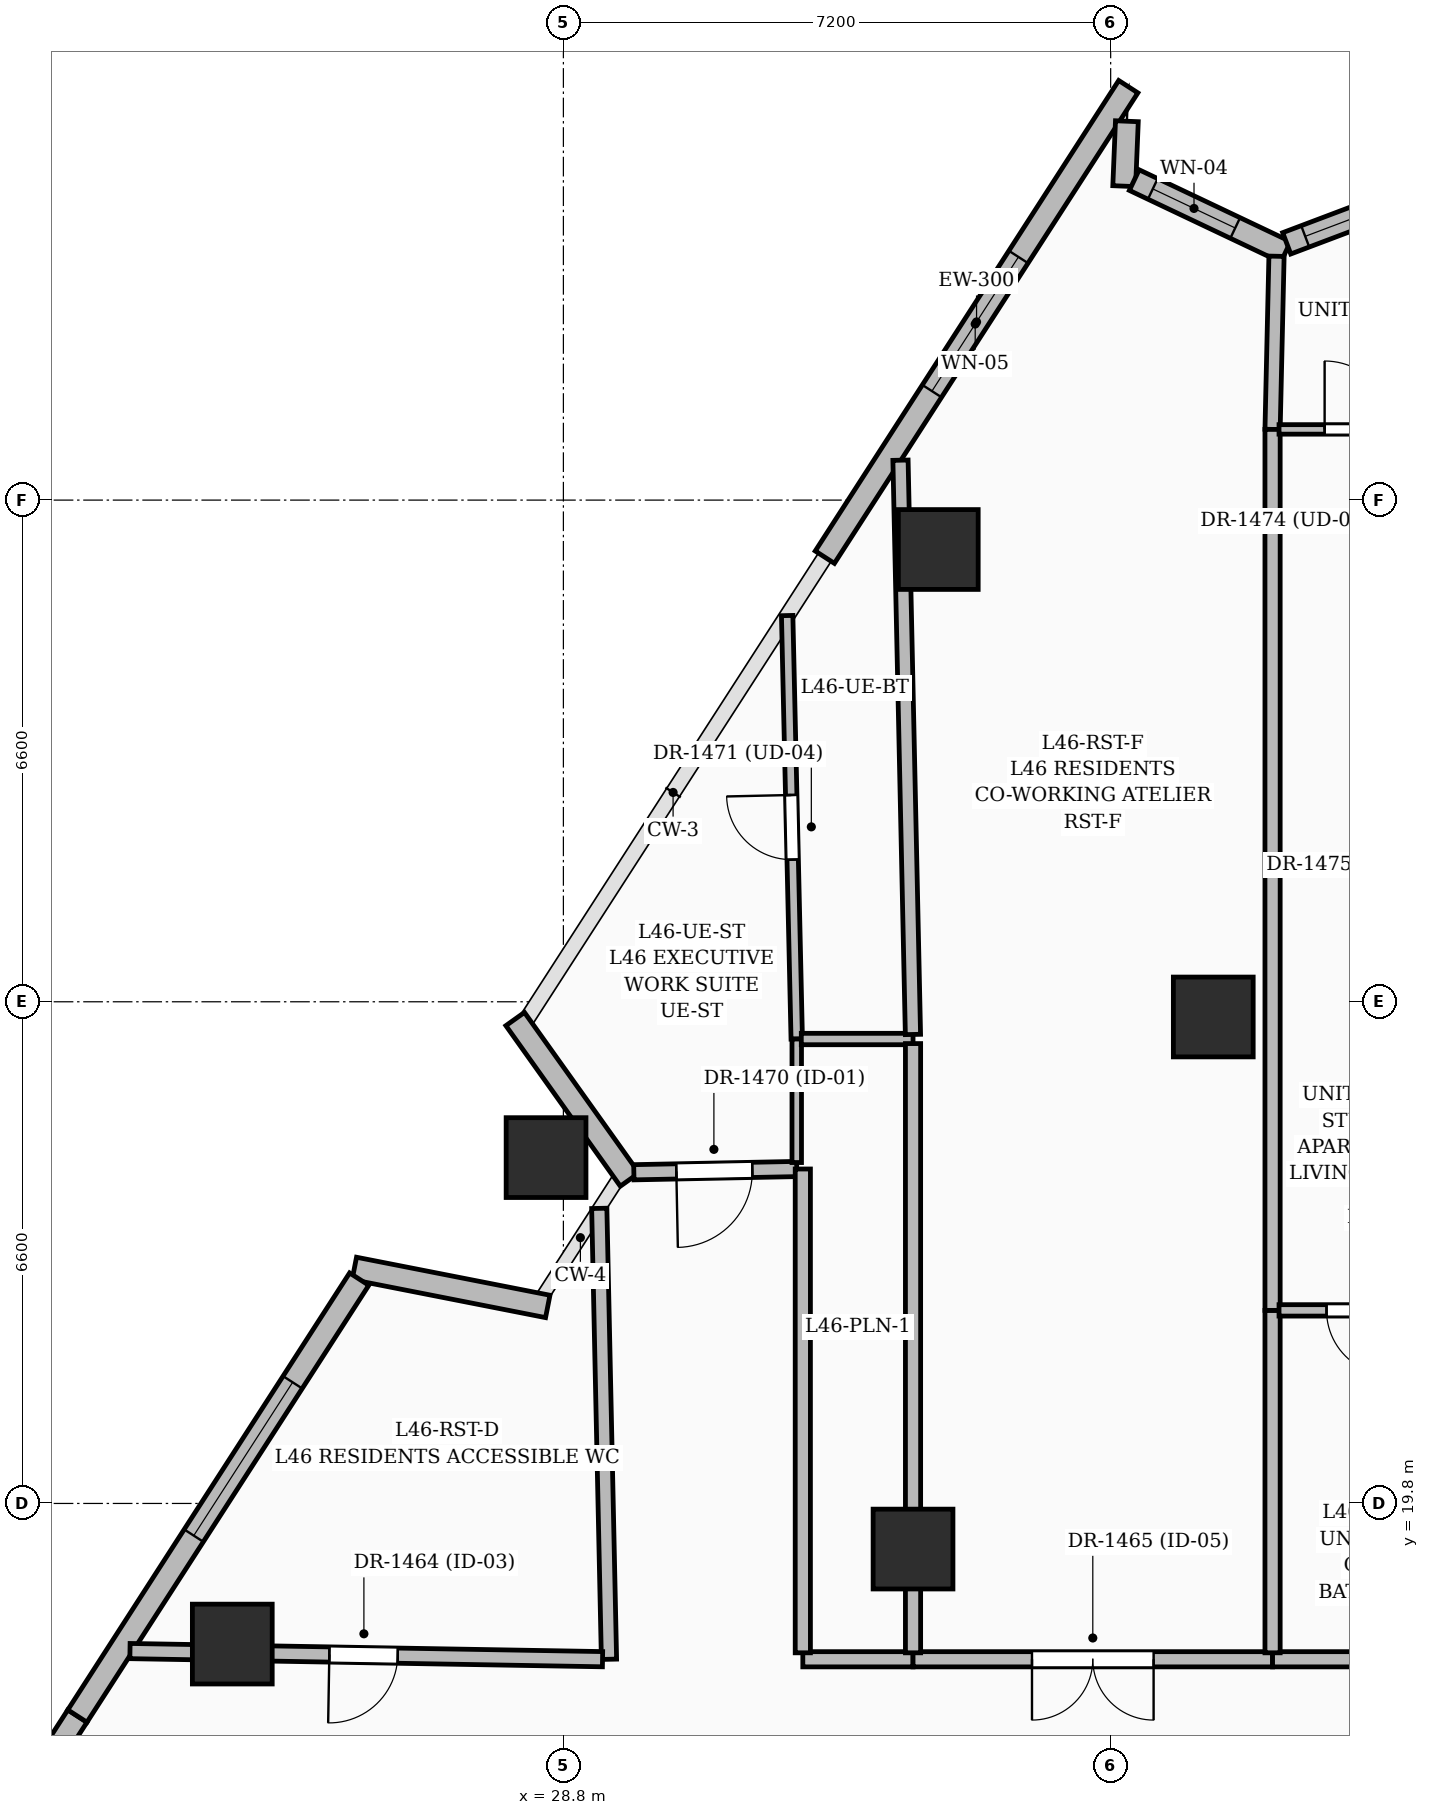
"""IFC4 building model, lengths in metres.
Left out: names, types, materials, properties, quantities, classifications, styles, units other than length and angle.
Written with IfcOpenShell. Run it as: python <this file> out.ifc"""

import sys

from ifc_helpers import new_model, si_unit, direction, frame, frame_2d, origin, origin_2d, place, context, subcontext, project, spatial, rectangle, extrude, element, fill, save


model = new_model("IFC4")
c1 = context("Model", 3, precision=1e-05, world=origin(), true_north=direction((0.0, 1.0)))
c2 = subcontext(c1, "Body", "Model", "MODEL_VIEW")
j1 = project(units=[si_unit("LENGTHUNIT", "METRE"), si_unit("PLANEANGLEUNIT", "RADIAN")], contexts=[c1])
p1 = place(None, origin())
s1 = spatial("IfcSite", under=j1, at=p1, CompositionType="ELEMENT")
p2 = place(p1, origin())
s2 = spatial("IfcBuilding", under=s1, at=p2, CompositionType="ELEMENT")
p3 = place(p2, frame((0.0, 0.0, 178.8)))
s3 = spatial("IfcBuildingStorey", under=s2, at=p3, CompositionType="ELEMENT", Elevation=178.8)
for number, where, z_axis, x_axis in (
    (1, (37.35, 26.2, 0.0), (0.0, 0.0, 1.0), (1.0, 0.0, 0.0)),
    (2, (33.4, 19.2, 0.0), (0.0, 0.0, 1.0), (1.0, 0.0, 0.0)),
    (3, (33.732, 32.35, 0.0), (0.0, 0.0, 1.0), (1.0, 0.0, 0.0)),
    (4, (28.572, 24.35, 0.0), (0.0, 0.0, 1.0), (1.0, 0.0, 0.0)),
    (5, (24.444, 17.95, 0.0), (0.0, 0.0, 1.0), (1.0, 0.0, 0.0)),
):
    element("IfcColumn", number, at=place(p3, frame(where, z_axis=z_axis, x_axis=x_axis)), inside=s3, PredefinedType="COLUMN", context=c2, shape_type="SweptSolid", body=[
        extrude(rectangle(XDim=1.05, YDim=1.05, at=origin_2d()), origin(), (0.0, 0.0, 1.0), 3.6),
    ])
p4 = place(p3, frame((26.05, 22.892, 0.0), z_axis=(0.0, 0.0, 1.0), x_axis=(0.9812411897, -0.192784147784, 0.0)))
e6 = element("IfcWall", 6, at=p4, inside=s3, PredefinedType="SOLIDWALL", context=c2, shape_type="SweptSolid", body=[
    extrude(rectangle(XDim=2.594, YDim=0.3, at=frame_2d((1.297, 0.0))), origin(), (0.0, 0.0, 1.0), 2.575),
])
p5 = place(p3, frame((29.671, 24.061, 0.0), z_axis=(0.0, 0.0, 1.0), x_axis=(-0.580472212384, 0.814280056645, 0.0)))
e7 = element("IfcWall", 7, at=p5, inside=s3, PredefinedType="SOLIDWALL", context=c2, shape_type="SweptSolid", body=[
    extrude(rectangle(XDim=2.594, YDim=0.3, at=frame_2d((1.297, 0.0))), origin(), (0.0, 0.0, 1.0), 2.575),
])
p6 = place(p3, frame((32.24, 32.249, 0.0), z_axis=(0.0, 0.0, 1.0), x_axis=(0.542023436135, 0.840363370621, 0.0)))
e8 = element("IfcWall", 8, at=p6, inside=s3, PredefinedType="SOLIDWALL", context=c2, shape_type="SweptSolid", body=[
    extrude(rectangle(XDim=7.366, YDim=0.3, at=frame_2d((3.683, 0.0))), origin(), (0.0, 0.0, 1.0), 3.35),
])
p7 = place(p6, frame((2.6, 0.0, 0.55)))
e9 = element("IfcOpeningElement", 9, at=p7, cuts=e8, PredefinedType="OPENING", context=c2, shape_type="SweptSolid", body=[
    extrude(rectangle(XDim=2.1, YDim=2.4, at=frame_2d((1.05, 1.2))), frame((0.0, 0.16, 0.0), z_axis=(0.0, -1.0, 0.0), x_axis=(1.0, 0.0, 0.0)), (0.0, 0.0, 1.0), 0.32),
])
p8 = place(p3, frame((36.213, 37.984, 0.0), z_axis=(0.0, 0.0, 1.0), x_axis=(-0.041119807978, -0.999154223027, 0.0)))
e10 = element("IfcWall", 10, at=p8, inside=s3, PredefinedType="SOLIDWALL", context=c2, shape_type="SweptSolid", body=[
    extrude(rectangle(XDim=0.855, YDim=0.3, at=frame_2d((0.427, 0.0))), origin(), (0.0, 0.0, 1.0), 3.35),
])
p9 = place(p3, frame((36.311, 37.21, 0.0), z_axis=(0.0, 0.0, 1.0), x_axis=(0.903471604204, -0.428647944585, 0.0)))
e11 = element("IfcWall", 11, at=p9, inside=s3, PredefinedType="SOLIDWALL", context=c2, shape_type="SweptSolid", body=[
    extrude(rectangle(XDim=2.205, YDim=0.3, at=frame_2d((1.103, 0.0))), origin(), (0.0, 0.0, 1.0), 3.35),
])
p10 = place(p9, frame((0.27, 0.0, 0.8)))
e12 = element("IfcOpeningElement", 12, at=p10, cuts=e11, PredefinedType="OPENING", context=c2, shape_type="SweptSolid", body=[
    extrude(rectangle(XDim=1.2, YDim=1.8, at=frame_2d((0.6, 0.9))), frame((0.0, 0.16, 0.0), z_axis=(0.0, -1.0, 0.0), x_axis=(1.0, 0.0, 0.0)), (0.0, 0.0, 1.0), 0.32),
])
p11 = place(p3, frame((38.316, 36.378, 0.0), z_axis=(0.0, 0.0, 1.0), x_axis=(0.935503953589, 0.353316222129, 0.0)))
e13 = element("IfcWall", 13, at=p11, inside=s3, PredefinedType="SOLIDWALL", context=c2, shape_type="SweptSolid", body=[
    extrude(rectangle(XDim=2.195, YDim=0.3, at=frame_2d((1.098, 0.0))), origin(), (0.0, 0.0, 1.0), 3.35),
])
p12 = place(p11, frame((0.26, 0.0, 0.8)))
e14 = element("IfcOpeningElement", 14, at=p12, cuts=e13, PredefinedType="OPENING", context=c2, shape_type="SweptSolid", body=[
    extrude(rectangle(XDim=1.2, YDim=1.8, at=frame_2d((0.6, 0.9))), frame((0.0, 0.16, 0.0), z_axis=(0.0, -1.0, 0.0), x_axis=(1.0, 0.0, 0.0)), (0.0, 0.0, 1.0), 0.32),
])
p13 = place(p3, frame((18.549, 11.023, 0.0), z_axis=(0.0, 0.0, 1.0), x_axis=(0.542031523986, 0.840358154006, 0.0)))
e15 = element("IfcWall", 15, at=p13, inside=s3, PredefinedType="SOLIDWALL", context=c2, shape_type="SweptSolid", body=[
    extrude(rectangle(XDim=7.116, YDim=0.3, at=frame_2d((3.558, 0.0))), origin(), (0.0, 0.0, 1.0), 3.35),
])
p14 = place(p13, frame((2.59, 0.0, 0.0)))
e16 = element("IfcOpeningElement", 16, at=p14, cuts=e15, PredefinedType="OPENING", context=c2, shape_type="SweptSolid", body=[
    extrude(rectangle(XDim=1.0, YDim=2.2, at=frame_2d((0.5, 1.1))), frame((0.0, 0.16, 0.0), z_axis=(0.0, -1.0, 0.0), x_axis=(1.0, 0.0, 0.0)), (0.0, 0.0, 1.0), 0.32),
])
p15 = place(p3, frame((22.406, 17.003, 0.0), z_axis=(0.0, 0.0, 1.0), x_axis=(0.542010619333, 0.840371637152, 0.0)))
e17 = element("IfcWall", 17, at=p15, inside=s3, PredefinedType="SOLIDWALL", context=c2, shape_type="SweptSolid", body=[
    extrude(rectangle(XDim=6.841, YDim=0.3, at=frame_2d((3.42, 0.0))), origin(), (0.0, 0.0, 1.0), 3.35),
])
p16 = place(p15, frame((2.825, 0.0, 0.6)))
e18 = element("IfcOpeningElement", 18, at=p16, cuts=e17, PredefinedType="OPENING", context=c2, shape_type="SweptSolid", body=[
    extrude(rectangle(XDim=2.4, YDim=2.1, at=frame_2d((1.2, 1.05))), frame((0.0, 0.16, 0.0), z_axis=(0.0, -1.0, 0.0), x_axis=(1.0, 0.0, 0.0)), (0.0, 0.0, 1.0), 0.32),
])
p17 = place(p3, frame((29.272, 23.682, 0.0), z_axis=(0.0, 0.0, 1.0), x_axis=(0.021561434878, -0.999767525241, 0.0)))
e19 = element("IfcWall", 19, at=p17, inside=s3, PredefinedType="PARTITIONING", context=c2, shape_type="SweptSolid", body=[
    extrude(rectangle(XDim=5.933, YDim=0.2, at=frame_2d((2.967, 0.0))), origin(), (0.0, 0.0, 1.0), 2.464),
])
p18 = place(p3, frame((29.315, 17.751, 0.0), z_axis=(0.0, 0.0, 1.0), x_axis=(-0.999852785832, 0.017158282639, 0.0)))
e20 = element("IfcWall", 20, at=p18, inside=s3, PredefinedType="PARTITIONING", context=c2, shape_type="SweptSolid", body=[
    extrude(rectangle(XDim=6.218, YDim=0.2, at=frame_2d((3.109, 0.0))), origin(), (0.0, 0.0, 1.0), 2.911),
])
p19 = place(p18, frame((2.695, 0.0, 0.0)))
e21 = element("IfcOpeningElement", 21, at=p19, cuts=e20, PredefinedType="OPENING", context=c2, shape_type="SweptSolid", body=[
    extrude(rectangle(XDim=0.9, YDim=2.1, at=frame_2d((0.45, 1.05))), frame((0.0, 0.11, 0.0), z_axis=(0.0, -1.0, 0.0), x_axis=(1.0, 0.0, 0.0)), (0.0, 0.0, 1.0), 0.22),
])
p20 = place(p3, frame((31.87, 24.2, 0.0), z_axis=(0.0, 0.0, 1.0), x_axis=(-0.999799056821, -0.020046096377, 0.0)))
e22 = element("IfcWall", 22, at=p20, inside=s3, PredefinedType="PARTITIONING", context=c2, shape_type="SweptSolid", body=[
    extrude(rectangle(XDim=2.144, YDim=0.2, at=frame_2d((1.072, 0.0))), origin(), (0.0, 0.0, 1.0), 2.911),
])
p21 = place(p20, frame((0.584, 0.0, 0.0)))
e23 = element("IfcOpeningElement", 23, at=p21, cuts=e22, PredefinedType="OPENING", context=c2, shape_type="SweptSolid", body=[
    extrude(rectangle(XDim=1.0, YDim=2.2, at=frame_2d((0.5, 1.1))), frame((0.0, 0.11, 0.0), z_axis=(0.0, -1.0, 0.0), x_axis=(1.0, 0.0, 0.0)), (0.0, 0.0, 1.0), 0.22),
])
p22 = place(p3, frame((33.4, 17.75, 0.0), z_axis=(0.0, 0.0, 1.0), x_axis=(-1.0, 0.0, 0.0)))
e24 = element("IfcWall", 24, at=p22, inside=s3, PredefinedType="PARTITIONING", context=c2, shape_type="SweptSolid", body=[
    extrude(rectangle(XDim=1.45, YDim=0.2, at=frame_2d((0.725, 0.0))), origin(), (0.0, 0.0, 1.0), 3.35),
])
p23 = place(p3, frame((31.95, 17.835, 0.0), z_axis=(0.0, 0.0, 1.0), x_axis=(0.0, 1.0, 0.0)))
e25 = element("IfcWall", 25, at=p23, inside=s3, PredefinedType="PARTITIONING", context=c2, shape_type="SweptSolid", body=[
    extrude(rectangle(XDim=6.365, YDim=0.2, at=frame_2d((3.183, 0.0))), origin(), (0.0, 0.0, 1.0), 2.464),
])
p24 = place(p3, frame((38.13, 17.75, 0.0), z_axis=(0.0, 0.0, 1.0), x_axis=(-1.0, 0.0, 0.0)))
e26 = element("IfcWall", 26, at=p24, inside=s3, PredefinedType="PARTITIONING", context=c2, shape_type="SweptSolid", body=[
    extrude(rectangle(XDim=4.73, YDim=0.2, at=frame_2d((2.365, 0.0))), origin(), (0.0, 0.0, 1.0), 2.436),
])
p25 = place(p24, frame((1.565, 0.0, 0.0)))
e27 = element("IfcOpeningElement", 27, at=p25, cuts=e26, PredefinedType="OPENING", context=c2, shape_type="SweptSolid", body=[
    extrude(rectangle(XDim=1.6, YDim=2.3, at=frame_2d((0.8, 1.15))), frame((0.0, 0.11, 0.0), z_axis=(0.0, -1.0, 0.0), x_axis=(1.0, 0.0, 0.0)), (0.0, 0.0, 1.0), 0.22),
])
p26 = place(p3, frame((41.365, 17.75, 0.0), z_axis=(0.0, 0.0, 1.0), x_axis=(-1.0, 0.0, 0.0)))
e28 = element("IfcWall", 28, at=p26, inside=s3, PredefinedType="PARTITIONING", context=c2, shape_type="SweptSolid", body=[
    extrude(rectangle(XDim=3.235, YDim=0.2, at=frame_2d((1.618, 0.0))), origin(), (0.0, 0.0, 1.0), 3.35),
])
p27 = place(p3, frame((31.87, 25.91, 0.0), z_axis=(0.0, 0.0, 1.0), x_axis=(-0.022650745341, 0.999743438956, 0.0)))
e29 = element("IfcWall", 29, at=p27, inside=s3, PredefinedType="PARTITIONING", context=c2, shape_type="SweptSolid", body=[
    extrude(rectangle(XDim=5.573, YDim=0.15, at=frame_2d((2.786, 0.0))), origin(), (0.0, 0.0, 1.0), 2.57),
])
p28 = place(p27, frame((2.361, 0.0, 0.0)))
e30 = element("IfcOpeningElement", 30, at=p28, cuts=e29, PredefinedType="OPENING", context=c2, shape_type="SweptSolid", body=[
    extrude(rectangle(XDim=0.85, YDim=2.1, at=frame_2d((0.425, 1.05))), frame((0.0, 0.085, 0.0), z_axis=(0.0, -1.0, 0.0), x_axis=(1.0, 0.0, 0.0)), (0.0, 0.0, 1.0), 0.17),
])
p29 = place(p3, frame((31.87, 25.91, 0.0), z_axis=(0.0, 0.0, 1.0), x_axis=(0.0, -1.0, 0.0)))
e31 = element("IfcWall", 31, at=p29, inside=s3, PredefinedType="PARTITIONING", context=c2, shape_type="SweptSolid", body=[
    extrude(rectangle(XDim=1.625, YDim=0.125, at=frame_2d((0.812, 0.0))), origin(), (0.0, 0.0, 1.0), 2.911),
])
p30 = place(p3, frame((31.93, 25.91, 0.0), z_axis=(0.0, 0.0, 1.0), x_axis=(1.0, 0.0, 0.0)))
e32 = element("IfcWall", 32, at=p30, inside=s3, PredefinedType="PARTITIONING", context=c2, shape_type="SweptSolid", body=[
    extrude(rectangle(XDim=1.47, YDim=0.15, at=frame_2d((0.735, 0.0))), origin(), (0.0, 0.0, 1.0), 2.911),
])
p31 = place(p3, frame((33.399, 25.97, 0.0), z_axis=(0.0, 0.0, 1.0), x_axis=(-0.021678536444, 0.999764992915, 0.0)))
e33 = element("IfcWall", 33, at=p31, inside=s3, PredefinedType="PARTITIONING", context=c2, shape_type="SweptSolid", body=[
    extrude(rectangle(XDim=7.557, YDim=0.2, at=frame_2d((3.778, 0.0))), origin(), (0.0, 0.0, 1.0), 2.57),
])
p32 = place(p3, frame((33.4, 17.835, 0.0), z_axis=(0.0, 0.0, 1.0), x_axis=(0.0, 1.0, 0.0)))
e34 = element("IfcWall", 34, at=p32, inside=s3, PredefinedType="PARTITIONING", context=c2, shape_type="SweptSolid", body=[
    extrude(rectangle(XDim=8.015, YDim=0.2, at=frame_2d((4.008, 0.0))), origin(), (0.0, 0.0, 1.0), 2.436),
])
p33 = place(p3, frame((38.13, 17.835, 0.0), z_axis=(0.0, 0.0, 1.0), x_axis=(0.0, 1.0, 0.0)))
e35 = element("IfcWall", 35, at=p33, inside=s3, PredefinedType="PARTITIONING", context=c2, shape_type="SweptSolid", body=[
    extrude(rectangle(XDim=4.505, YDim=0.2, at=frame_2d((2.252, 0.0))), origin(), (0.0, 0.0, 1.0), 3.35),
])
p34 = place(p3, frame((38.13, 33.93, 0.0), z_axis=(0.0, 0.0, 1.0), x_axis=(0.022821190318, 0.999739562722, 0.0)))
e36 = element("IfcWall", 36, at=p34, inside=s3, PredefinedType="PARTITIONING", context=c2, shape_type="SweptSolid", body=[
    extrude(rectangle(XDim=2.279, YDim=0.2, at=frame_2d((1.139, 0.0))), origin(), (0.0, 0.0, 1.0), 3.35),
])
p35 = place(p3, frame((38.13, 22.34, 0.0), z_axis=(0.0, 0.0, 1.0), x_axis=(0.0, 1.0, 0.0)))
e37 = element("IfcWall", 37, at=p35, inside=s3, PredefinedType="PARTITIONING", context=c2, shape_type="SweptSolid", body=[
    extrude(rectangle(XDim=11.59, YDim=0.2, at=frame_2d((5.795, 0.0))), origin(), (0.0, 0.0, 1.0), 2.436),
])
p36 = place(p3, frame((40.34, 22.34, 0.0), z_axis=(0.0, 0.0, 1.0), x_axis=(-1.0, 0.0, 0.0)))
e38 = element("IfcWall", 38, at=p36, inside=s3, PredefinedType="PARTITIONING", context=c2, shape_type="SweptSolid", body=[
    extrude(rectangle(XDim=2.125, YDim=0.15, at=frame_2d((1.062, 0.0))), origin(), (0.0, 0.0, 1.0), 3.35),
])
p37 = place(p36, frame((0.65, 0.0, 0.0)))
e39 = element("IfcOpeningElement", 39, at=p37, cuts=e38, PredefinedType="OPENING", context=c2, shape_type="SweptSolid", body=[
    extrude(rectangle(XDim=0.85, YDim=2.1, at=frame_2d((0.425, 1.05))), frame((0.0, 0.085, 0.0), z_axis=(0.0, -1.0, 0.0), x_axis=(1.0, 0.0, 0.0)), (0.0, 0.0, 1.0), 0.17),
])
p38 = place(p3, frame((38.215, 33.93, 0.0), z_axis=(0.0, 0.0, 1.0), x_axis=(1.0, 0.0, 0.0)))
e40 = element("IfcWall", 40, at=p38, inside=s3, PredefinedType="PARTITIONING", context=c2, shape_type="SweptSolid", body=[
    extrude(rectangle(XDim=2.185, YDim=0.125, at=frame_2d((1.092, 0.0))), origin(), (0.0, 0.0, 1.0), 3.35),
])
p39 = place(p38, frame((0.6, 0.0, 0.0)))
e41 = element("IfcOpeningElement", 41, at=p39, cuts=e40, PredefinedType="OPENING", context=c2, shape_type="SweptSolid", body=[
    extrude(rectangle(XDim=0.9, YDim=2.15, at=frame_2d((0.45, 1.075))), frame((0.0, 0.072, 0.0), z_axis=(0.0, -1.0, 0.0), x_axis=(1.0, 0.0, 0.0)), (0.0, 0.0, 1.0), 0.145),
])
p40 = place(p7, origin())
e42 = element("IfcWindow", 42, at=p40, inside=s3, PartitioningType="SINGLE_PANEL", PredefinedType="WINDOW", context=c2, shape_type="SweptSolid", body=[
    extrude(rectangle(XDim=2.1, YDim=2.4, at=frame_2d((1.05, 1.2))), frame((0.0, 0.03, 0.0), z_axis=(0.0, -1.0, 0.0), x_axis=(1.0, 0.0, 0.0)), (0.0, 0.0, 1.0), 0.06),
])
fill(e9, e42)
p41 = place(p10, origin())
e43 = element("IfcWindow", 43, at=p41, inside=s3, PartitioningType="SINGLE_PANEL", PredefinedType="WINDOW", context=c2, shape_type="SweptSolid", body=[
    extrude(rectangle(XDim=1.2, YDim=1.8, at=frame_2d((0.6, 0.9))), frame((0.0, 0.03, 0.0), z_axis=(0.0, -1.0, 0.0), x_axis=(1.0, 0.0, 0.0)), (0.0, 0.0, 1.0), 0.06),
])
fill(e12, e43)
p42 = place(p12, origin())
e44 = element("IfcWindow", 44, at=p42, inside=s3, PartitioningType="SINGLE_PANEL", PredefinedType="WINDOW", context=c2, shape_type="SweptSolid", body=[
    extrude(rectangle(XDim=1.2, YDim=1.8, at=frame_2d((0.6, 0.9))), frame((0.0, 0.03, 0.0), z_axis=(0.0, -1.0, 0.0), x_axis=(1.0, 0.0, 0.0)), (0.0, 0.0, 1.0), 0.06),
])
fill(e14, e44)
p43 = place(p16, origin())
e45 = element("IfcWindow", 45, at=p43, inside=s3, PartitioningType="SINGLE_PANEL", PredefinedType="WINDOW", context=c2, shape_type="SweptSolid", body=[
    extrude(rectangle(XDim=2.4, YDim=2.1, at=frame_2d((1.2, 1.05))), frame((0.0, 0.03, 0.0), z_axis=(0.0, -1.0, 0.0), x_axis=(1.0, 0.0, 0.0)), (0.0, 0.0, 1.0), 0.06),
])
fill(e18, e45)
p44 = place(p19, origin())
e46 = element("IfcDoor", 46, at=p44, inside=s3, OperationType="SINGLE_SWING_RIGHT", PredefinedType="DOOR", context=c2, shape_type="SweptSolid", body=[
    extrude(rectangle(XDim=0.9, YDim=2.1, at=frame_2d((0.45, 1.05))), frame((0.0, 0.025, 0.0), z_axis=(0.0, -1.0, 0.0), x_axis=(1.0, 0.0, 0.0)), (0.0, 0.0, 1.0), 0.05),
])
fill(e21, e46)
p45 = place(p25, origin())
e47 = element("IfcDoor", 47, at=p45, inside=s3, OperationType="DOUBLE_DOOR_SINGLE_SWING", PredefinedType="DOOR", context=c2, shape_type="SweptSolid", body=[
    extrude(rectangle(XDim=1.6, YDim=2.3, at=frame_2d((0.8, 1.15))), frame((0.0, 0.025, 0.0), z_axis=(0.0, -1.0, 0.0), x_axis=(1.0, 0.0, 0.0)), (0.0, 0.0, 1.0), 0.05),
])
fill(e27, e47)
p46 = place(p21, origin())
e48 = element("IfcDoor", 48, at=p46, inside=s3, OperationType="SINGLE_SWING_RIGHT", PredefinedType="DOOR", context=c2, shape_type="SweptSolid", body=[
    extrude(rectangle(XDim=1.0, YDim=2.2, at=frame_2d((0.5, 1.1))), frame((0.0, 0.025, 0.0), z_axis=(0.0, -1.0, 0.0), x_axis=(1.0, 0.0, 0.0)), (0.0, 0.0, 1.0), 0.05),
])
fill(e23, e48)
p47 = place(p28, origin())
e49 = element("IfcDoor", 49, at=p47, inside=s3, OperationType="SINGLE_SWING_RIGHT", PredefinedType="DOOR", context=c2, shape_type="SweptSolid", body=[
    extrude(rectangle(XDim=0.85, YDim=2.1, at=frame_2d((0.425, 1.05))), frame((0.0, 0.025, 0.0), z_axis=(0.0, -1.0, 0.0), x_axis=(1.0, 0.0, 0.0)), (0.0, 0.0, 1.0), 0.05),
])
fill(e30, e49)
p48 = place(p39, origin())
e50 = element("IfcDoor", 50, at=p48, inside=s3, OperationType="SINGLE_SWING_LEFT", PredefinedType="DOOR", context=c2, shape_type="SweptSolid", body=[
    extrude(rectangle(XDim=0.9, YDim=2.15, at=frame_2d((0.45, 1.075))), frame((0.0, 0.025, 0.0), z_axis=(0.0, -1.0, 0.0), x_axis=(1.0, 0.0, 0.0)), (0.0, 0.0, 1.0), 0.05),
])
fill(e41, e50)
p49 = place(p37, origin())
e51 = element("IfcDoor", 51, at=p49, inside=s3, OperationType="SINGLE_SWING_LEFT", PredefinedType="DOOR", context=c2, shape_type="SweptSolid", body=[
    extrude(rectangle(XDim=0.85, YDim=2.1, at=frame_2d((0.425, 1.05))), frame((0.0, 0.025, 0.0), z_axis=(0.0, -1.0, 0.0), x_axis=(1.0, 0.0, 0.0)), (0.0, 0.0, 1.0), 0.05),
])
fill(e39, e51)
save(model, sys.argv[1])
